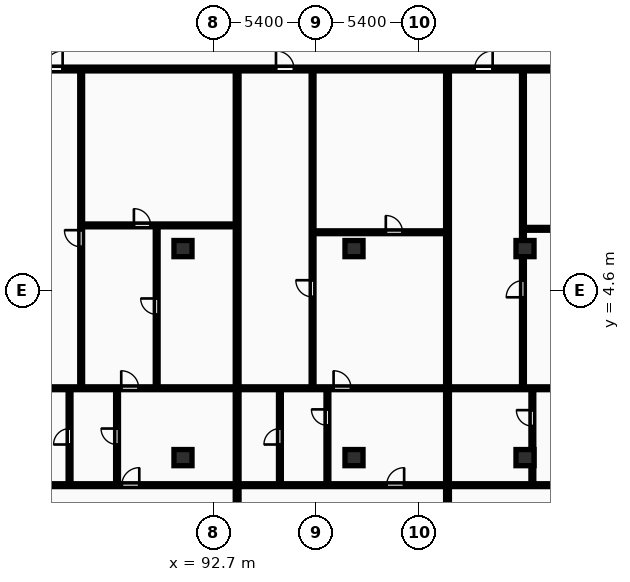
"""IFC4 building model, lengths in metres.
Left out: names, types, materials, properties, quantities, classifications, styles, units other than length and angle.
Written with IfcOpenShell. Run it as: python <this file> out.ifc"""

import sys

from ifc_helpers import new_model, si_unit, direction, frame, frame_2d, origin, origin_2d, place, context, subcontext, project, spatial, rectangle, extrude, element, fill, save


model = new_model("IFC4")
c1 = context("Model", 3, precision=1e-05, world=origin(), true_north=direction((0.0, 1.0)))
c2 = subcontext(c1, "Body", "Model", "MODEL_VIEW")
j1 = project(units=[si_unit("LENGTHUNIT", "METRE"), si_unit("PLANEANGLEUNIT", "RADIAN")], contexts=[c1])
p1 = place(None, origin())
s1 = spatial("IfcSite", under=j1, at=p1, CompositionType="ELEMENT")
p2 = place(p1, origin())
s2 = spatial("IfcBuilding", under=s1, at=p2, CompositionType="ELEMENT")
p3 = place(p2, frame((0.0, 0.0, 24.0)))
s3 = spatial("IfcBuildingStorey", under=s2, at=p3, CompositionType="ELEMENT", Elevation=24.0)
for number, where, z_axis, x_axis in (
    (1, (91.1, -4.2, 0.0), (0.0, 0.0, 1.0), (1.0, 0.0, 0.0)),
    (2, (91.1, 6.8, 0.0), (0.0, 0.0, 1.0), (1.0, 0.0, 0.0)),
    (3, (100.1, -4.2, 0.0), (0.0, 0.0, 1.0), (1.0, 0.0, 0.0)),
    (4, (100.1, 6.8, 0.0), (0.0, 0.0, 1.0), (1.0, 0.0, 0.0)),
    (5, (109.1, -4.2, 0.0), (0.0, 0.0, 1.0), (1.0, 0.0, 0.0)),
    (6, (109.1, 6.8, 0.0), (0.0, 0.0, 1.0), (1.0, 0.0, 0.0)),
):
    element("IfcColumn", number, at=place(p3, frame(where, z_axis=z_axis, x_axis=x_axis)), inside=s3, PredefinedType="COLUMN", context=c2, shape_type="SweptSolid", body=[
        extrude(rectangle(XDim=0.95, YDim=0.85, at=origin_2d()), origin(), (0.0, 0.0, 1.0), 3.25),
    ])
p4 = place(p3, frame((93.95, -10.9, 0.0), z_axis=(0.0, 0.0, 1.0), x_axis=(0.0, 1.0, 0.0)))
e7 = element("IfcWall", 7, at=p4, inside=s3, PredefinedType="PARTITIONING", context=c2, shape_type="SweptSolid", body=[
    extrude(rectangle(XDim=27.07, YDim=0.2, at=frame_2d((13.535, 0.0))), origin(), (0.0, 0.0, 1.0), 2.97),
])
p5 = place(p3, frame((89.716, -0.51, 0.0), z_axis=(0.0, 0.0, 1.0), x_axis=(0.0, 1.0, 0.0)))
e8 = element("IfcWall", 8, at=p5, inside=s3, PredefinedType="PARTITIONING", context=c2, shape_type="SweptSolid", body=[
    extrude(rectangle(XDim=8.53, YDim=0.15, at=frame_2d((4.265, 0.0))), origin(), (0.0, 0.0, 1.0), 2.97),
])
p6 = place(p5, frame((3.845, 0.0, 0.0)))
e9 = element("IfcOpeningElement", 9, at=p6, cuts=e8, PredefinedType="OPENING", context=c2, shape_type="SweptSolid", body=[
    extrude(rectangle(XDim=0.84, YDim=2.04, at=frame_2d((0.42, 1.02))), frame((0.0, 0.085, 0.0), z_axis=(0.0, -1.0, 0.0), x_axis=(1.0, 0.0, 0.0)), (0.0, 0.0, 1.0), 0.17),
])
p7 = place(p3, frame((85.802, 8.02, 0.0), z_axis=(0.0, 0.0, 1.0), x_axis=(1.0, 0.0, 0.0)))
e10 = element("IfcWall", 10, at=p7, inside=s3, PredefinedType="PARTITIONING", context=c2, shape_type="SweptSolid", body=[
    extrude(rectangle(XDim=8.069, YDim=0.15, at=frame_2d((4.034, 0.0))), origin(), (0.0, 0.0, 1.0), 2.97),
])
p8 = place(p7, frame((2.716, 0.0, 0.0)))
e11 = element("IfcOpeningElement", 11, at=p8, cuts=e10, PredefinedType="OPENING", context=c2, shape_type="SweptSolid", body=[
    extrude(rectangle(XDim=0.88, YDim=2.06, at=frame_2d((0.44, 1.03))), frame((0.0, 0.085, 0.0), z_axis=(0.0, -1.0, 0.0), x_axis=(1.0, 0.0, 0.0)), (0.0, 0.0, 1.0), 0.17),
])
p9 = place(p3, frame((85.741, -0.51, 0.0), z_axis=(0.0, 0.0, 1.0), x_axis=(0.0, 1.0, 0.0)))
e12 = element("IfcWall", 12, at=p9, inside=s3, PredefinedType="PARTITIONING", context=c2, shape_type="SweptSolid", body=[
    extrude(rectangle(XDim=16.7, YDim=0.15, at=frame_2d((8.35, 0.0))), origin(), (0.0, 0.0, 1.0), 2.97),
])
p10 = place(p9, frame((7.4, 0.0, 0.0)))
e13 = element("IfcOpeningElement", 13, at=p10, cuts=e12, PredefinedType="OPENING", context=c2, shape_type="SweptSolid", body=[
    extrude(rectangle(XDim=0.88, YDim=2.06, at=frame_2d((0.44, 1.03))), frame((0.0, 0.085, 0.0), z_axis=(0.0, -1.0, 0.0), x_axis=(1.0, 0.0, 0.0)), (0.0, 0.0, 1.0), 0.17),
])
p11 = place(p3, frame((85.13, -5.59, 0.0), z_axis=(0.0, 0.0, 1.0), x_axis=(0.0, 1.0, 0.0)))
e14 = element("IfcWall", 14, at=p11, inside=s3, PredefinedType="PARTITIONING", context=c2, shape_type="SweptSolid", body=[
    extrude(rectangle(XDim=5.0, YDim=0.15, at=frame_2d((2.5, 0.0))), origin(), (0.0, 0.0, 1.0), 2.97),
])
p12 = place(p11, frame((2.08, 0.0, 0.0)))
e15 = element("IfcOpeningElement", 15, at=p12, cuts=e14, PredefinedType="OPENING", context=c2, shape_type="SweptSolid", body=[
    extrude(rectangle(XDim=0.84, YDim=2.04, at=frame_2d((0.42, 1.02))), frame((0.0, 0.085, 0.0), z_axis=(0.0, -1.0, 0.0), x_axis=(1.0, 0.0, 0.0)), (0.0, 0.0, 1.0), 0.17),
])
p13 = place(p3, frame((87.63, -5.59, 0.0), z_axis=(0.0, 0.0, 1.0), x_axis=(0.0, 1.0, 0.0)))
e16 = element("IfcWall", 16, at=p13, inside=s3, PredefinedType="PARTITIONING", context=c2, shape_type="SweptSolid", body=[
    extrude(rectangle(XDim=5.0, YDim=0.15, at=frame_2d((2.5, 0.0))), origin(), (0.0, 0.0, 1.0), 2.97),
])
p14 = place(p13, frame((2.08, 0.0, 0.0)))
e17 = element("IfcOpeningElement", 17, at=p14, cuts=e16, PredefinedType="OPENING", context=c2, shape_type="SweptSolid", body=[
    extrude(rectangle(XDim=0.84, YDim=2.04, at=frame_2d((0.42, 1.02))), frame((0.0, 0.085, 0.0), z_axis=(0.0, -1.0, 0.0), x_axis=(1.0, 0.0, 0.0)), (0.0, 0.0, 1.0), 0.17),
])
p15 = place(p3, frame((81.851, -0.55, 0.0), z_axis=(0.0, 0.0, 1.0), x_axis=(1.0, 0.0, 0.0)))
e18 = element("IfcWall", 18, at=p15, inside=s3, PredefinedType="PARTITIONING", context=c2, shape_type="SweptSolid", body=[
    extrude(rectangle(XDim=12.019, YDim=0.15, at=frame_2d((6.009, 0.0))), origin(), (0.0, 0.0, 1.0), 2.97),
])
p16 = place(p15, frame((5.999, 0.0, 0.0)))
e19 = element("IfcOpeningElement", 19, at=p16, cuts=e18, PredefinedType="OPENING", context=c2, shape_type="SweptSolid", body=[
    extrude(rectangle(XDim=0.92, YDim=2.08, at=frame_2d((0.46, 1.04))), frame((0.0, 0.085, 0.0), z_axis=(0.0, -1.0, 0.0), x_axis=(1.0, 0.0, 0.0)), (0.0, 0.0, 1.0), 0.17),
])
p17 = place(p3, frame((81.851, -5.65, 0.0), z_axis=(0.0, 0.0, 1.0), x_axis=(1.0, 0.0, 0.0)))
e20 = element("IfcWall", 20, at=p17, inside=s3, PredefinedType="PARTITIONING", context=c2, shape_type="SweptSolid", body=[
    extrude(rectangle(XDim=12.019, YDim=0.15, at=frame_2d((6.009, 0.0))), origin(), (0.0, 0.0, 1.0), 2.97),
])
p18 = place(p17, frame((6.029, 0.0, 0.0)))
e21 = element("IfcOpeningElement", 21, at=p18, cuts=e20, PredefinedType="OPENING", context=c2, shape_type="SweptSolid", body=[
    extrude(rectangle(XDim=0.92, YDim=2.08, at=frame_2d((0.46, 1.04))), frame((0.0, 0.085, 0.0), z_axis=(0.0, -1.0, 0.0), x_axis=(1.0, 0.0, 0.0)), (0.0, 0.0, 1.0), 0.17),
])
p19 = place(p3, frame((105.021, -10.9, 0.0), z_axis=(0.0, 0.0, 1.0), x_axis=(0.0, 1.0, 0.0)))
e22 = element("IfcWall", 22, at=p19, inside=s3, PredefinedType="PARTITIONING", context=c2, shape_type="SweptSolid", body=[
    extrude(rectangle(XDim=27.07, YDim=0.2, at=frame_2d((13.535, 0.0))), origin(), (0.0, 0.0, 1.0), 2.97),
])
p20 = place(p3, frame((97.98, 7.66, 0.0), z_axis=(0.0, 0.0, 1.0), x_axis=(1.0, 0.0, 0.0)))
e23 = element("IfcWall", 23, at=p20, inside=s3, PredefinedType="PARTITIONING", context=c2, shape_type="SweptSolid", body=[
    extrude(rectangle(XDim=6.961, YDim=0.15, at=frame_2d((3.481, 0.0))), origin(), (0.0, 0.0, 1.0), 2.97),
])
p21 = place(p20, frame((3.794, 0.0, 0.0)))
e24 = element("IfcOpeningElement", 24, at=p21, cuts=e23, PredefinedType="OPENING", context=c2, shape_type="SweptSolid", body=[
    extrude(rectangle(XDim=0.88, YDim=2.06, at=frame_2d((0.44, 1.03))), frame((0.0, 0.085, 0.0), z_axis=(0.0, -1.0, 0.0), x_axis=(1.0, 0.0, 0.0)), (0.0, 0.0, 1.0), 0.17),
])
p22 = place(p3, frame((97.92, -0.51, 0.0), z_axis=(0.0, 0.0, 1.0), x_axis=(0.0, 1.0, 0.0)))
e25 = element("IfcWall", 25, at=p22, inside=s3, PredefinedType="PARTITIONING", context=c2, shape_type="SweptSolid", body=[
    extrude(rectangle(XDim=16.7, YDim=0.15, at=frame_2d((8.35, 0.0))), origin(), (0.0, 0.0, 1.0), 2.97),
])
p23 = place(p22, frame((4.765, 0.0, 0.0)))
e26 = element("IfcOpeningElement", 26, at=p23, cuts=e25, PredefinedType="OPENING", context=c2, shape_type="SweptSolid", body=[
    extrude(rectangle(XDim=0.88, YDim=2.06, at=frame_2d((0.44, 1.03))), frame((0.0, 0.085, 0.0), z_axis=(0.0, -1.0, 0.0), x_axis=(1.0, 0.0, 0.0)), (0.0, 0.0, 1.0), 0.17),
])
p24 = place(p3, frame((96.201, -5.59, 0.0), z_axis=(0.0, 0.0, 1.0), x_axis=(0.0, 1.0, 0.0)))
e27 = element("IfcWall", 27, at=p24, inside=s3, PredefinedType="PARTITIONING", context=c2, shape_type="SweptSolid", body=[
    extrude(rectangle(XDim=5.0, YDim=0.15, at=frame_2d((2.5, 0.0))), origin(), (0.0, 0.0, 1.0), 2.97),
])
p25 = place(p24, frame((2.08, 0.0, 0.0)))
e28 = element("IfcOpeningElement", 28, at=p25, cuts=e27, PredefinedType="OPENING", context=c2, shape_type="SweptSolid", body=[
    extrude(rectangle(XDim=0.84, YDim=2.04, at=frame_2d((0.42, 1.02))), frame((0.0, 0.085, 0.0), z_axis=(0.0, -1.0, 0.0), x_axis=(1.0, 0.0, 0.0)), (0.0, 0.0, 1.0), 0.17),
])
p26 = place(p3, frame((98.701, -5.59, 0.0), z_axis=(0.0, 0.0, 1.0), x_axis=(0.0, 1.0, 0.0)))
e29 = element("IfcWall", 29, at=p26, inside=s3, PredefinedType="PARTITIONING", context=c2, shape_type="SweptSolid", body=[
    extrude(rectangle(XDim=5.0, YDim=0.15, at=frame_2d((2.5, 0.0))), origin(), (0.0, 0.0, 1.0), 2.97),
])
p27 = place(p26, frame((3.088, 0.0, 0.0)))
e30 = element("IfcOpeningElement", 30, at=p27, cuts=e29, PredefinedType="OPENING", context=c2, shape_type="SweptSolid", body=[
    extrude(rectangle(XDim=0.84, YDim=2.04, at=frame_2d((0.42, 1.02))), frame((0.0, 0.085, 0.0), z_axis=(0.0, -1.0, 0.0), x_axis=(1.0, 0.0, 0.0)), (0.0, 0.0, 1.0), 0.17),
])
p28 = place(p3, frame((94.03, -0.55, 0.0), z_axis=(0.0, 0.0, 1.0), x_axis=(1.0, 0.0, 0.0)))
e31 = element("IfcWall", 31, at=p28, inside=s3, PredefinedType="PARTITIONING", context=c2, shape_type="SweptSolid", body=[
    extrude(rectangle(XDim=10.911, YDim=0.15, at=frame_2d((5.456, 0.0))), origin(), (0.0, 0.0, 1.0), 2.97),
])
p29 = place(p28, frame((4.996, 0.0, 0.0)))
e32 = element("IfcOpeningElement", 32, at=p29, cuts=e31, PredefinedType="OPENING", context=c2, shape_type="SweptSolid", body=[
    extrude(rectangle(XDim=0.92, YDim=2.08, at=frame_2d((0.46, 1.04))), frame((0.0, 0.085, 0.0), z_axis=(0.0, -1.0, 0.0), x_axis=(1.0, 0.0, 0.0)), (0.0, 0.0, 1.0), 0.17),
])
p30 = place(p3, frame((94.03, -5.65, 0.0), z_axis=(0.0, 0.0, 1.0), x_axis=(1.0, 0.0, 0.0)))
e33 = element("IfcWall", 33, at=p30, inside=s3, PredefinedType="PARTITIONING", context=c2, shape_type="SweptSolid", body=[
    extrude(rectangle(XDim=10.911, YDim=0.15, at=frame_2d((5.456, 0.0))), origin(), (0.0, 0.0, 1.0), 2.97),
])
p31 = place(p30, frame((7.789, 0.0, 0.0)))
e34 = element("IfcOpeningElement", 34, at=p31, cuts=e33, PredefinedType="OPENING", context=c2, shape_type="SweptSolid", body=[
    extrude(rectangle(XDim=0.92, YDim=2.08, at=frame_2d((0.46, 1.04))), frame((0.0, 0.085, 0.0), z_axis=(0.0, -1.0, 0.0), x_axis=(1.0, 0.0, 0.0)), (0.0, 0.0, 1.0), 0.17),
])
p32 = place(p3, frame((109.052, 7.84, 0.0), z_axis=(0.0, 0.0, 1.0), x_axis=(1.0, 0.0, 0.0)))
e35 = element("IfcWall", 35, at=p32, inside=s3, PredefinedType="PARTITIONING", context=c2, shape_type="SweptSolid", body=[
    extrude(rectangle(XDim=9.176, YDim=0.15, at=frame_2d((4.588, 0.0))), origin(), (0.0, 0.0, 1.0), 2.97),
])
p33 = place(p32, frame((3.307, 0.0, 0.0)))
e36 = element("IfcOpeningElement", 36, at=p33, cuts=e35, PredefinedType="OPENING", context=c2, shape_type="SweptSolid", body=[
    extrude(rectangle(XDim=0.88, YDim=2.06, at=frame_2d((0.44, 1.03))), frame((0.0, 0.085, 0.0), z_axis=(0.0, -1.0, 0.0), x_axis=(1.0, 0.0, 0.0)), (0.0, 0.0, 1.0), 0.17),
])
p34 = place(p3, frame((108.991, -0.51, 0.0), z_axis=(0.0, 0.0, 1.0), x_axis=(0.0, 1.0, 0.0)))
e37 = element("IfcWall", 37, at=p34, inside=s3, PredefinedType="PARTITIONING", context=c2, shape_type="SweptSolid", body=[
    extrude(rectangle(XDim=16.7, YDim=0.15, at=frame_2d((8.35, 0.0))), origin(), (0.0, 0.0, 1.0), 2.22),
])
p35 = place(p34, frame((4.747, 0.0, 0.0)))
e38 = element("IfcOpeningElement", 38, at=p35, cuts=e37, PredefinedType="OPENING", context=c2, shape_type="SweptSolid", body=[
    extrude(rectangle(XDim=0.88, YDim=2.06, at=frame_2d((0.44, 1.03))), frame((0.0, 0.085, 0.0), z_axis=(0.0, -1.0, 0.0), x_axis=(1.0, 0.0, 0.0)), (0.0, 0.0, 1.0), 0.17),
])
p36 = place(p3, frame((109.487, -5.59, 0.0), z_axis=(0.0, 0.0, 1.0), x_axis=(0.0, 1.0, 0.0)))
e39 = element("IfcWall", 39, at=p36, inside=s3, PredefinedType="PARTITIONING", context=c2, shape_type="SweptSolid", body=[
    extrude(rectangle(XDim=5.0, YDim=0.15, at=frame_2d((2.5, 0.0))), origin(), (0.0, 0.0, 1.0), 2.22),
])
p37 = place(p36, frame((3.049, 0.0, 0.0)))
e40 = element("IfcOpeningElement", 40, at=p37, cuts=e39, PredefinedType="OPENING", context=c2, shape_type="SweptSolid", body=[
    extrude(rectangle(XDim=0.84, YDim=2.04, at=frame_2d((0.42, 1.02))), frame((0.0, 0.085, 0.0), z_axis=(0.0, -1.0, 0.0), x_axis=(1.0, 0.0, 0.0)), (0.0, 0.0, 1.0), 0.17),
])
p38 = place(p3, frame((105.101, -0.55, 0.0), z_axis=(0.0, 0.0, 1.0), x_axis=(1.0, 0.0, 0.0)))
e41 = element("IfcWall", 41, at=p38, inside=s3, PredefinedType="PARTITIONING", context=c2, shape_type="SweptSolid", body=[
    extrude(rectangle(XDim=13.126, YDim=0.15, at=frame_2d((6.563, 0.0))), origin(), (0.0, 0.0, 1.0), 2.97),
])
p39 = place(p38, frame((7.106, 0.0, 0.0)))
e42 = element("IfcOpeningElement", 42, at=p39, cuts=e41, PredefinedType="OPENING", context=c2, shape_type="SweptSolid", body=[
    extrude(rectangle(XDim=0.92, YDim=2.08, at=frame_2d((0.46, 1.04))), frame((0.0, 0.085, 0.0), z_axis=(0.0, -1.0, 0.0), x_axis=(1.0, 0.0, 0.0)), (0.0, 0.0, 1.0), 0.17),
])
p40 = place(p3, frame((105.101, -5.65, 0.0), z_axis=(0.0, 0.0, 1.0), x_axis=(1.0, 0.0, 0.0)))
e43 = element("IfcWall", 43, at=p40, inside=s3, PredefinedType="PARTITIONING", context=c2, shape_type="SweptSolid", body=[
    extrude(rectangle(XDim=13.126, YDim=0.15, at=frame_2d((6.563, 0.0))), origin(), (0.0, 0.0, 1.0), 2.97),
])
p41 = place(p40, frame((7.136, 0.0, 0.0)))
e44 = element("IfcOpeningElement", 44, at=p41, cuts=e43, PredefinedType="OPENING", context=c2, shape_type="SweptSolid", body=[
    extrude(rectangle(XDim=0.92, YDim=2.08, at=frame_2d((0.46, 1.04))), frame((0.0, 0.085, 0.0), z_axis=(0.0, -1.0, 0.0), x_axis=(1.0, 0.0, 0.0)), (0.0, 0.0, 1.0), 0.17),
])
p42 = place(p3, frame((70.7, 16.25, 0.0), z_axis=(0.0, 0.0, 1.0), x_axis=(1.0, 0.0, 0.0)))
e45 = element("IfcWall", 45, at=p42, inside=s3, PredefinedType="PARTITIONING", context=c2, shape_type="SweptSolid", body=[
    extrude(rectangle(XDim=62.0, YDim=0.2, at=frame_2d((31.0, 0.0))), origin(), (0.0, 0.0, 1.0), 2.97),
])
p43 = place(p42, frame((1.186, 0.0, 0.0)))
e46 = element("IfcOpeningElement", 46, at=p43, cuts=e45, PredefinedType="OPENING", context=c2, shape_type="SweptSolid", body=[
    extrude(rectangle(XDim=0.95, YDim=2.15, at=frame_2d((0.475, 1.075))), frame((0.0, 0.11, 0.0), z_axis=(0.0, -1.0, 0.0), x_axis=(1.0, 0.0, 0.0)), (0.0, 0.0, 1.0), 0.22),
])
p44 = place(p42, frame((13.116, 0.0, 0.0)))
e47 = element("IfcOpeningElement", 47, at=p44, cuts=e45, PredefinedType="OPENING", context=c2, shape_type="SweptSolid", body=[
    extrude(rectangle(XDim=0.95, YDim=2.15, at=frame_2d((0.475, 1.075))), frame((0.0, 0.11, 0.0), z_axis=(0.0, -1.0, 0.0), x_axis=(1.0, 0.0, 0.0)), (0.0, 0.0, 1.0), 0.22),
])
p45 = place(p42, frame((25.295, 0.0, 0.0)))
e48 = element("IfcOpeningElement", 48, at=p45, cuts=e45, PredefinedType="OPENING", context=c2, shape_type="SweptSolid", body=[
    extrude(rectangle(XDim=0.95, YDim=2.15, at=frame_2d((0.475, 1.075))), frame((0.0, 0.11, 0.0), z_axis=(0.0, -1.0, 0.0), x_axis=(1.0, 0.0, 0.0)), (0.0, 0.0, 1.0), 0.22),
])
p46 = place(p42, frame((35.747, 0.0, 0.0)))
e49 = element("IfcOpeningElement", 49, at=p46, cuts=e45, PredefinedType="OPENING", context=c2, shape_type="SweptSolid", body=[
    extrude(rectangle(XDim=0.95, YDim=2.15, at=frame_2d((0.475, 1.075))), frame((0.0, 0.11, 0.0), z_axis=(0.0, -1.0, 0.0), x_axis=(1.0, 0.0, 0.0)), (0.0, 0.0, 1.0), 0.22),
])
p47 = place(p42, frame((49.652, 0.0, 0.0)))
e50 = element("IfcOpeningElement", 50, at=p47, cuts=e45, PredefinedType="OPENING", context=c2, shape_type="SweptSolid", body=[
    extrude(rectangle(XDim=0.95, YDim=2.15, at=frame_2d((0.475, 1.075))), frame((0.0, 0.11, 0.0), z_axis=(0.0, -1.0, 0.0), x_axis=(1.0, 0.0, 0.0)), (0.0, 0.0, 1.0), 0.22),
])
p48 = place(p6, origin())
e51 = element("IfcDoor", 51, at=p48, inside=s3, OperationType="SINGLE_SWING_RIGHT", PredefinedType="DOOR", context=c2, shape_type="SweptSolid", body=[
    extrude(rectangle(XDim=0.84, YDim=2.04, at=frame_2d((0.42, 1.02))), frame((0.0, 0.025, 0.0), z_axis=(0.0, -1.0, 0.0), x_axis=(1.0, 0.0, 0.0)), (0.0, 0.0, 1.0), 0.05),
])
fill(e9, e51)
p49 = place(p8, origin())
e52 = element("IfcDoor", 52, at=p49, inside=s3, OperationType="SINGLE_SWING_LEFT", PredefinedType="DOOR", context=c2, shape_type="SweptSolid", body=[
    extrude(rectangle(XDim=0.88, YDim=2.06, at=frame_2d((0.44, 1.03))), frame((0.0, 0.025, 0.0), z_axis=(0.0, -1.0, 0.0), x_axis=(1.0, 0.0, 0.0)), (0.0, 0.0, 1.0), 0.05),
])
fill(e11, e52)
p50 = place(p10, origin())
e53 = element("IfcDoor", 53, at=p50, inside=s3, OperationType="SINGLE_SWING_RIGHT", PredefinedType="DOOR", context=c2, shape_type="SweptSolid", body=[
    extrude(rectangle(XDim=0.88, YDim=2.06, at=frame_2d((0.44, 1.03))), frame((0.0, 0.025, 0.0), z_axis=(0.0, -1.0, 0.0), x_axis=(1.0, 0.0, 0.0)), (0.0, 0.0, 1.0), 0.05),
])
fill(e13, e53)
p51 = place(p12, origin())
e54 = element("IfcDoor", 54, at=p51, inside=s3, OperationType="SINGLE_SWING_LEFT", PredefinedType="DOOR", context=c2, shape_type="SweptSolid", body=[
    extrude(rectangle(XDim=0.84, YDim=2.04, at=frame_2d((0.42, 1.02))), frame((0.0, 0.025, 0.0), z_axis=(0.0, -1.0, 0.0), x_axis=(1.0, 0.0, 0.0)), (0.0, 0.0, 1.0), 0.05),
])
fill(e15, e54)
p52 = place(p14, origin())
e55 = element("IfcDoor", 55, at=p52, inside=s3, OperationType="SINGLE_SWING_RIGHT", PredefinedType="DOOR", context=c2, shape_type="SweptSolid", body=[
    extrude(rectangle(XDim=0.84, YDim=2.04, at=frame_2d((0.42, 1.02))), frame((0.0, 0.025, 0.0), z_axis=(0.0, -1.0, 0.0), x_axis=(1.0, 0.0, 0.0)), (0.0, 0.0, 1.0), 0.05),
])
fill(e17, e55)
p53 = place(p16, origin())
e56 = element("IfcDoor", 56, at=p53, inside=s3, OperationType="SINGLE_SWING_LEFT", PredefinedType="DOOR", context=c2, shape_type="SweptSolid", body=[
    extrude(rectangle(XDim=0.92, YDim=2.08, at=frame_2d((0.46, 1.04))), frame((0.0, 0.025, 0.0), z_axis=(0.0, -1.0, 0.0), x_axis=(1.0, 0.0, 0.0)), (0.0, 0.0, 1.0), 0.05),
])
fill(e19, e56)
p54 = place(p18, origin())
e57 = element("IfcDoor", 57, at=p54, inside=s3, OperationType="SINGLE_SWING_RIGHT", PredefinedType="DOOR", context=c2, shape_type="SweptSolid", body=[
    extrude(rectangle(XDim=0.92, YDim=2.08, at=frame_2d((0.46, 1.04))), frame((0.0, 0.025, 0.0), z_axis=(0.0, -1.0, 0.0), x_axis=(1.0, 0.0, 0.0)), (0.0, 0.0, 1.0), 0.05),
])
fill(e21, e57)
p55 = place(p21, origin())
e58 = element("IfcDoor", 58, at=p55, inside=s3, OperationType="SINGLE_SWING_LEFT", PredefinedType="DOOR", context=c2, shape_type="SweptSolid", body=[
    extrude(rectangle(XDim=0.88, YDim=2.06, at=frame_2d((0.44, 1.03))), frame((0.0, 0.025, 0.0), z_axis=(0.0, -1.0, 0.0), x_axis=(1.0, 0.0, 0.0)), (0.0, 0.0, 1.0), 0.05),
])
fill(e24, e58)
p56 = place(p23, origin())
e59 = element("IfcDoor", 59, at=p56, inside=s3, OperationType="SINGLE_SWING_RIGHT", PredefinedType="DOOR", context=c2, shape_type="SweptSolid", body=[
    extrude(rectangle(XDim=0.88, YDim=2.06, at=frame_2d((0.44, 1.03))), frame((0.0, 0.025, 0.0), z_axis=(0.0, -1.0, 0.0), x_axis=(1.0, 0.0, 0.0)), (0.0, 0.0, 1.0), 0.05),
])
fill(e26, e59)
p57 = place(p25, origin())
e60 = element("IfcDoor", 60, at=p57, inside=s3, OperationType="SINGLE_SWING_LEFT", PredefinedType="DOOR", context=c2, shape_type="SweptSolid", body=[
    extrude(rectangle(XDim=0.84, YDim=2.04, at=frame_2d((0.42, 1.02))), frame((0.0, 0.025, 0.0), z_axis=(0.0, -1.0, 0.0), x_axis=(1.0, 0.0, 0.0)), (0.0, 0.0, 1.0), 0.05),
])
fill(e28, e60)
p58 = place(p27, origin())
e61 = element("IfcDoor", 61, at=p58, inside=s3, OperationType="SINGLE_SWING_RIGHT", PredefinedType="DOOR", context=c2, shape_type="SweptSolid", body=[
    extrude(rectangle(XDim=0.84, YDim=2.04, at=frame_2d((0.42, 1.02))), frame((0.0, 0.025, 0.0), z_axis=(0.0, -1.0, 0.0), x_axis=(1.0, 0.0, 0.0)), (0.0, 0.0, 1.0), 0.05),
])
fill(e30, e61)
p59 = place(p29, origin())
e62 = element("IfcDoor", 62, at=p59, inside=s3, OperationType="SINGLE_SWING_LEFT", PredefinedType="DOOR", context=c2, shape_type="SweptSolid", body=[
    extrude(rectangle(XDim=0.92, YDim=2.08, at=frame_2d((0.46, 1.04))), frame((0.0, 0.025, 0.0), z_axis=(0.0, -1.0, 0.0), x_axis=(1.0, 0.0, 0.0)), (0.0, 0.0, 1.0), 0.05),
])
fill(e32, e62)
p60 = place(p31, origin())
e63 = element("IfcDoor", 63, at=p60, inside=s3, OperationType="SINGLE_SWING_RIGHT", PredefinedType="DOOR", context=c2, shape_type="SweptSolid", body=[
    extrude(rectangle(XDim=0.92, YDim=2.08, at=frame_2d((0.46, 1.04))), frame((0.0, 0.025, 0.0), z_axis=(0.0, -1.0, 0.0), x_axis=(1.0, 0.0, 0.0)), (0.0, 0.0, 1.0), 0.05),
])
fill(e34, e63)
p61 = place(p35, origin())
e64 = element("IfcDoor", 64, at=p61, inside=s3, OperationType="SINGLE_SWING_LEFT", PredefinedType="DOOR", context=c2, shape_type="SweptSolid", body=[
    extrude(rectangle(XDim=0.88, YDim=2.06, at=frame_2d((0.44, 1.03))), frame((0.0, 0.025, 0.0), z_axis=(0.0, -1.0, 0.0), x_axis=(1.0, 0.0, 0.0)), (0.0, 0.0, 1.0), 0.05),
])
fill(e38, e64)
p62 = place(p37, origin())
e65 = element("IfcDoor", 65, at=p62, inside=s3, OperationType="SINGLE_SWING_RIGHT", PredefinedType="DOOR", context=c2, shape_type="SweptSolid", body=[
    extrude(rectangle(XDim=0.84, YDim=2.04, at=frame_2d((0.42, 1.02))), frame((0.0, 0.025, 0.0), z_axis=(0.0, -1.0, 0.0), x_axis=(1.0, 0.0, 0.0)), (0.0, 0.0, 1.0), 0.05),
])
fill(e40, e65)
p63 = place(p44, origin())
e66 = element("IfcDoor", 66, at=p63, inside=s3, OperationType="SINGLE_SWING_RIGHT", PredefinedType="DOOR", context=c2, shape_type="SweptSolid", body=[
    extrude(rectangle(XDim=0.95, YDim=2.15, at=frame_2d((0.475, 1.075))), frame((0.0, 0.025, 0.0), z_axis=(0.0, -1.0, 0.0), x_axis=(1.0, 0.0, 0.0)), (0.0, 0.0, 1.0), 0.05),
])
fill(e47, e66)
p64 = place(p45, origin())
e67 = element("IfcDoor", 67, at=p64, inside=s3, OperationType="SINGLE_SWING_LEFT", PredefinedType="DOOR", context=c2, shape_type="SweptSolid", body=[
    extrude(rectangle(XDim=0.95, YDim=2.15, at=frame_2d((0.475, 1.075))), frame((0.0, 0.025, 0.0), z_axis=(0.0, -1.0, 0.0), x_axis=(1.0, 0.0, 0.0)), (0.0, 0.0, 1.0), 0.05),
])
fill(e48, e67)
p65 = place(p46, origin())
e68 = element("IfcDoor", 68, at=p65, inside=s3, OperationType="SINGLE_SWING_RIGHT", PredefinedType="DOOR", context=c2, shape_type="SweptSolid", body=[
    extrude(rectangle(XDim=0.95, YDim=2.15, at=frame_2d((0.475, 1.075))), frame((0.0, 0.025, 0.0), z_axis=(0.0, -1.0, 0.0), x_axis=(1.0, 0.0, 0.0)), (0.0, 0.0, 1.0), 0.05),
])
fill(e49, e68)
save(model, sys.argv[1])
